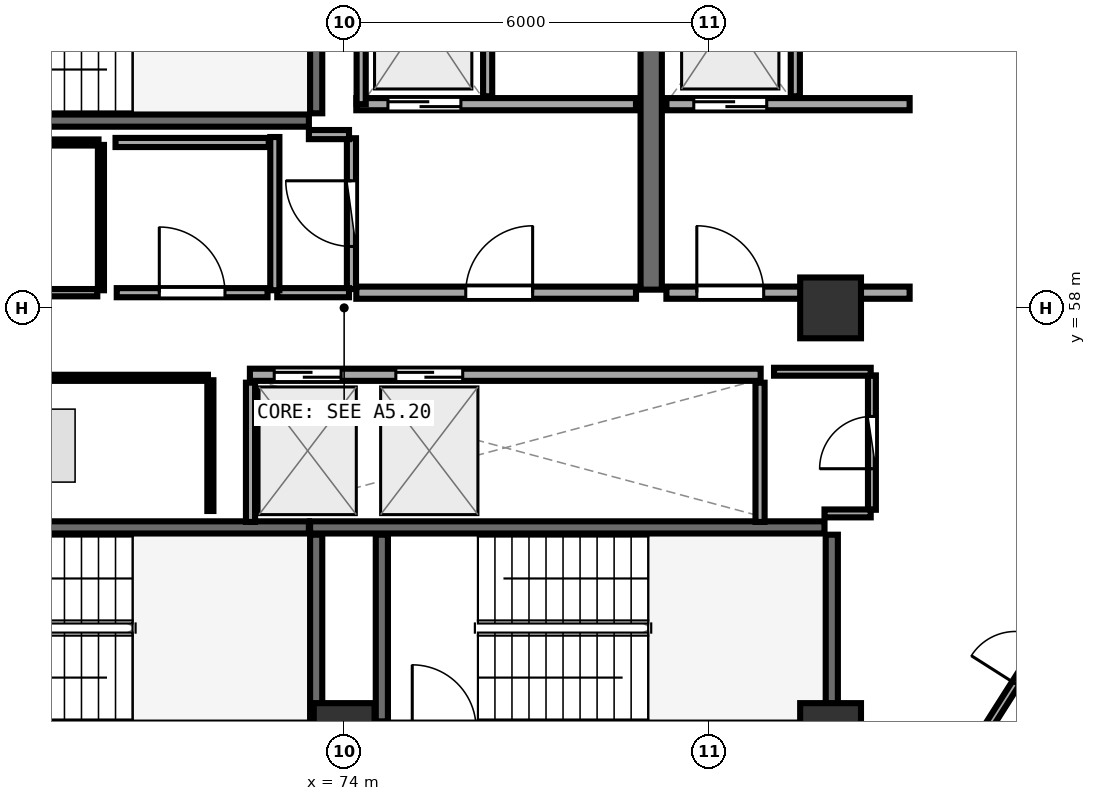
"""IFC4 building model, lengths in metres.
Left out: names, types, materials, properties, quantities, classifications, styles, units other than length and angle.
Written with IfcOpenShell. Run it as: python <this file> out.ifc"""

import sys

from ifc_helpers import new_model, si_unit, direction, frame, frame_2d, origin, origin_2d, place, context, subcontext, project, spatial, rectangle, extrude, element, fill, save


model = new_model("IFC4")
c1 = context("Model", 3, precision=1e-05, world=origin(), true_north=direction((0.0, 1.0)))
c2 = subcontext(c1, "Body", "Model", "MODEL_VIEW")
j1 = project(units=[si_unit("LENGTHUNIT", "METRE"), si_unit("PLANEANGLEUNIT", "RADIAN")], contexts=[c1])
p1 = place(None, origin())
s1 = spatial("IfcSite", under=j1, at=p1, CompositionType="ELEMENT")
p2 = place(p1, origin())
s2 = spatial("IfcBuilding", under=s1, at=p2, CompositionType="ELEMENT")
p3 = place(p2, frame((0.0, 0.0, 252.45)))
s3 = spatial("IfcBuildingStorey", under=s2, at=p3, CompositionType="ELEMENT", Elevation=252.45)
for number, where, z_axis, x_axis in (
    (1, (74.0, 51.0, 0.0), (0.0, 0.0, 1.0), (1.0, 0.0, 0.0)),
    (2, (82.0, 51.0, 0.0), (0.0, 0.0, 1.0), (1.0, 0.0, 0.0)),
    (3, (82.0, 58.0, 0.0), (0.0, 0.0, 1.0), (1.0, 0.0, 0.0)),
):
    element("IfcColumn", number, at=place(p3, frame(where, z_axis=z_axis, x_axis=x_axis)), inside=s3, PredefinedType="PILASTER", context=c2, shape_type="SweptSolid", body=[
        extrude(rectangle(XDim=1.0, YDim=1.0, at=origin_2d()), origin(), (0.0, 0.0, 1.0), 3.75),
    ])
p4 = place(p3, frame((66.26, 61.08, 0.0), z_axis=(0.0, 0.0, 1.0), x_axis=(1.0, 0.0, 0.0)))
e4 = element("IfcWall", 4, at=p4, inside=s3, PredefinedType="SHEAR", context=c2, shape_type="SweptSolid", body=[
    extrude(rectangle(XDim=7.16, YDim=0.2, at=frame_2d((3.58, 0.0))), origin(), (0.0, 0.0, 1.0), 3.49),
])
for number, where, z_axis, x_axis in (
    (5, (73.54, 61.2, 0.0), (0.0, 0.0, 1.0), (0.0, 1.0, 0.0)),
    (6, (82.02, 51.2, 0.0), (0.0, 0.0, 1.0), (0.0, 1.0, 0.0)),
):
    element("IfcWall", number, at=place(p3, frame(where, z_axis=z_axis, x_axis=x_axis)), inside=s3, PredefinedType="SHEAR", context=c2, shape_type="SweptSolid", body=[
        extrude(rectangle(XDim=3.07, YDim=0.2, at=frame_2d((1.535, 0.0))), origin(), (0.0, 0.0, 1.0), 3.49),
    ])
p5 = place(p3, frame((81.9, 54.39, 0.0), z_axis=(0.0, 0.0, 1.0), x_axis=(-1.0, 0.0, 0.0)))
e7 = element("IfcWall", 7, at=p5, inside=s3, PredefinedType="SHEAR", context=c2, shape_type="SweptSolid", body=[
    extrude(rectangle(XDim=8.46, YDim=0.2, at=frame_2d((4.23, 0.0))), origin(), (0.0, 0.0, 1.0), 3.49),
])
for number, where, z_axis, x_axis in (
    (8, (74.62, 54.27, 0.0), (0.0, 0.0, 1.0), (0.0, -1.0, 0.0)),
    (9, (73.54, 51.2, 0.0), (0.0, 0.0, 1.0), (0.0, 1.0, 0.0)),
):
    element("IfcWall", number, at=place(p3, frame(where, z_axis=z_axis, x_axis=x_axis)), inside=s3, PredefinedType="SHEAR", context=c2, shape_type="SweptSolid", body=[
        extrude(rectangle(XDim=3.07, YDim=0.2, at=frame_2d((1.535, 0.0))), origin(), (0.0, 0.0, 1.0), 3.49),
    ])
p6 = place(p3, frame((73.42, 54.39, 0.0), z_axis=(0.0, 0.0, 1.0), x_axis=(-1.0, 0.0, 0.0)))
e10 = element("IfcWall", 10, at=p6, inside=s3, PredefinedType="SHEAR", context=c2, shape_type="SweptSolid", body=[
    extrude(rectangle(XDim=7.16, YDim=0.2, at=frame_2d((3.58, 0.0))), origin(), (0.0, 0.0, 1.0), 3.49),
])
p7 = place(p3, frame((79.05, 58.3, 0.0), z_axis=(0.0, 0.0, 1.0), x_axis=(0.0, 1.0, 0.0)))
e11 = element("IfcWall", 11, at=p7, inside=s3, PredefinedType="SHEAR", context=c2, shape_type="SweptSolid", body=[
    extrude(rectangle(XDim=6.3, YDim=0.35, at=frame_2d((3.15, 0.0))), origin(), (0.0, 0.0, 1.0), 3.49),
])
p8 = place(p3, frame((74.2, 61.35, 0.0), z_axis=(0.0, 0.0, 1.0), x_axis=(1.0, 0.0, 0.0)))
e12 = element("IfcWall", 12, at=p8, inside=s3, PredefinedType="SOLIDWALL", context=c2, shape_type="SweptSolid", body=[
    extrude(rectangle(XDim=4.6, YDim=0.2, at=frame_2d((2.3, 0.0))), origin(), (0.0, 0.0, 1.0), 3.48),
])
p9 = place(p8, frame((0.52, 0.0, 0.0)))
e13 = element("IfcOpeningElement", 13, at=p9, cuts=e12, PredefinedType="OPENING", context=c2, shape_type="SweptSolid", body=[
    extrude(rectangle(XDim=1.2, YDim=2.15, at=frame_2d((0.6, 1.075))), frame((0.0, 0.11, 0.0), z_axis=(0.0, -1.0, 0.0), x_axis=(1.0, 0.0, 0.0)), (0.0, 0.0, 1.0), 0.22),
])
p10 = place(p3, frame((74.28, 61.35, 0.0), z_axis=(0.0, 0.0, 1.0), x_axis=(0.0, 1.0, 0.0)))
e14 = element("IfcWall", 14, at=p10, inside=s3, PredefinedType="PARTITIONING", context=c2, shape_type="SweptSolid", body=[
    extrude(rectangle(XDim=2.97, YDim=0.15, at=frame_2d((1.485, 0.0))), origin(), (0.0, 0.0, 1.0), 3.48),
])
p11 = place(p3, frame((76.36, 61.48, 0.0), z_axis=(0.0, 0.0, 1.0), x_axis=(0.0, 1.0, 0.0)))
e15 = element("IfcWall", 15, at=p11, inside=s3, PredefinedType="PARTITIONING", context=c2, shape_type="SweptSolid", body=[
    extrude(rectangle(XDim=2.84, YDim=0.15, at=frame_2d((1.42, 0.0))), origin(), (0.0, 0.0, 1.0), 3.48),
])
p12 = place(p3, frame((79.3, 61.35, 0.0), z_axis=(0.0, 0.0, 1.0), x_axis=(1.0, 0.0, 0.0)))
e16 = element("IfcWall", 16, at=p12, inside=s3, PredefinedType="SOLIDWALL", context=c2, shape_type="SweptSolid", body=[
    extrude(rectangle(XDim=4.0, YDim=0.2, at=frame_2d((2.0, 0.0))), origin(), (0.0, 0.0, 1.0), 2.775),
])
p13 = place(p12, frame((0.45, 0.0, 0.0)))
e17 = element("IfcOpeningElement", 17, at=p13, cuts=e16, PredefinedType="OPENING", context=c2, shape_type="SweptSolid", body=[
    extrude(rectangle(XDim=1.2, YDim=2.15, at=frame_2d((0.6, 1.075))), frame((0.0, 0.11, 0.0), z_axis=(0.0, -1.0, 0.0), x_axis=(1.0, 0.0, 0.0)), (0.0, 0.0, 1.0), 0.22),
])
p14 = place(p3, frame((81.42, 61.48, 0.0), z_axis=(0.0, 0.0, 1.0), x_axis=(0.0, 1.0, 0.0)))
e18 = element("IfcWall", 18, at=p14, inside=s3, PredefinedType="PARTITIONING", context=c2, shape_type="SweptSolid", body=[
    extrude(rectangle(XDim=2.84, YDim=0.15, at=frame_2d((1.42, 0.0))), origin(), (0.0, 0.0, 1.0), 3.48),
])
p15 = place(p3, frame((74.2, 58.25, 0.0), z_axis=(0.0, 0.0, 1.0), x_axis=(1.0, 0.0, 0.0)))
e19 = element("IfcWall", 19, at=p15, inside=s3, PredefinedType="SOLIDWALL", context=c2, shape_type="SweptSolid", body=[
    extrude(rectangle(XDim=4.6, YDim=0.2, at=frame_2d((2.3, 0.0))), origin(), (0.0, 0.0, 1.0), 3.48),
])
p16 = place(p15, frame((1.8, 0.0, 0.0)))
e20 = element("IfcOpeningElement", 20, at=p16, cuts=e19, PredefinedType="OPENING", context=c2, shape_type="SweptSolid", body=[
    extrude(rectangle(XDim=1.1, YDim=2.1, at=frame_2d((0.55, 1.05))), frame((0.0, 0.11, 0.0), z_axis=(0.0, -1.0, 0.0), x_axis=(1.0, 0.0, 0.0)), (0.0, 0.0, 1.0), 0.22),
])
p17 = place(p3, frame((79.3, 58.25, 0.0), z_axis=(0.0, 0.0, 1.0), x_axis=(1.0, 0.0, 0.0)))
e21 = element("IfcWall", 21, at=p17, inside=s3, PredefinedType="SOLIDWALL", context=c2, shape_type="SweptSolid", body=[
    extrude(rectangle(XDim=4.0, YDim=0.2, at=frame_2d((2.0, 0.0))), origin(), (0.0, 0.0, 1.0), 2.775),
])
p18 = place(p17, frame((0.5, 0.0, 0.0)))
e22 = element("IfcOpeningElement", 22, at=p18, cuts=e21, PredefinedType="OPENING", context=c2, shape_type="SweptSolid", body=[
    extrude(rectangle(XDim=1.1, YDim=2.1, at=frame_2d((0.55, 1.05))), frame((0.0, 0.11, 0.0), z_axis=(0.0, -1.0, 0.0), x_axis=(1.0, 0.0, 0.0)), (0.0, 0.0, 1.0), 0.22),
])
p19 = place(p3, frame((72.45, 56.9, 0.0), z_axis=(0.0, 0.0, 1.0), x_axis=(1.0, 0.0, 0.0)))
e23 = element("IfcWall", 23, at=p19, inside=s3, PredefinedType="SOLIDWALL", context=c2, shape_type="SweptSolid", body=[
    extrude(rectangle(XDim=8.4, YDim=0.2, at=frame_2d((4.2, 0.0))), origin(), (0.0, 0.0, 1.0), 3.48),
])
p20 = place(p19, frame((0.4, 0.0, 0.0)))
e24 = element("IfcOpeningElement", 24, at=p20, cuts=e23, PredefinedType="OPENING", context=c2, shape_type="SweptSolid", body=[
    extrude(rectangle(XDim=1.1, YDim=2.1, at=frame_2d((0.55, 1.05))), frame((0.0, 0.11, 0.0), z_axis=(0.0, -1.0, 0.0), x_axis=(1.0, 0.0, 0.0)), (0.0, 0.0, 1.0), 0.22),
])
p21 = place(p19, frame((2.4, 0.0, 0.0)))
e25 = element("IfcOpeningElement", 25, at=p21, cuts=e23, PredefinedType="OPENING", context=c2, shape_type="SweptSolid", body=[
    extrude(rectangle(XDim=1.1, YDim=2.1, at=frame_2d((0.55, 1.05))), frame((0.0, 0.11, 0.0), z_axis=(0.0, -1.0, 0.0), x_axis=(1.0, 0.0, 0.0)), (0.0, 0.0, 1.0), 0.22),
])
for number, where, z_axis, x_axis in (
    (26, (72.46, 54.48, 0.0), (0.0, 0.0, 1.0), (0.0, 1.0, 0.0)),
    (27, (80.84, 54.48, 0.0), (0.0, 0.0, 1.0), (0.0, 1.0, 0.0)),
):
    element("IfcWall", number, at=place(p3, frame(where, z_axis=z_axis, x_axis=x_axis)), inside=s3, PredefinedType="PARTITIONING", context=c2, shape_type="SweptSolid", body=[
        extrude(rectangle(XDim=2.29, YDim=0.15, at=frame_2d((1.145, 0.0))), origin(), (0.0, 0.0, 1.0), 3.48),
    ])
p22 = place(p3, frame((74.12, 58.31, 0.0), z_axis=(0.0, 0.0, 1.0), x_axis=(0.0, 1.0, 0.0)))
e28 = element("IfcWall", 28, at=p22, inside=s3, PredefinedType="PARTITIONING", context=c2, shape_type="SweptSolid", body=[
    extrude(rectangle(XDim=2.48, YDim=0.15, at=frame_2d((1.24, 0.0))), origin(), (0.0, 0.0, 1.0), 3.48),
])
p23 = place(p22, frame((0.7, 0.0, 0.0)))
e29 = element("IfcOpeningElement", 29, at=p23, cuts=e28, PredefinedType="OPENING", context=c2, shape_type="SweptSolid", body=[
    extrude(rectangle(XDim=1.08, YDim=2.1, at=frame_2d((0.54, 1.05))), frame((0.0, 0.085, 0.0), z_axis=(0.0, -1.0, 0.0), x_axis=(1.0, 0.0, 0.0)), (0.0, 0.0, 1.0), 0.17),
])
p24 = place(p3, frame((82.68, 54.68, 0.0), z_axis=(0.0, 0.0, 1.0), x_axis=(0.0, 1.0, 0.0)))
e30 = element("IfcWall", 30, at=p24, inside=s3, PredefinedType="PLUMBINGWALL", context=c2, shape_type="SweptSolid", body=[
    extrude(rectangle(XDim=2.21, YDim=0.13, at=frame_2d((1.105, 0.0))), origin(), (0.0, 0.0, 1.0), 3.48),
])
p25 = place(p24, frame((0.675, 0.0, 0.0)))
e31 = element("IfcOpeningElement", 31, at=p25, cuts=e30, PredefinedType="OPENING", context=c2, shape_type="SweptSolid", body=[
    extrude(rectangle(XDim=0.86, YDim=2.05, at=frame_2d((0.43, 1.025))), frame((0.0, 0.075, 0.0), z_axis=(0.0, -1.0, 0.0), x_axis=(1.0, 0.0, 0.0)), (0.0, 0.0, 1.0), 0.15),
])
p26 = place(p3, frame((66.61, 58.25, 0.0), z_axis=(0.0, 0.0, 1.0), x_axis=(1.0, 0.0, 0.0)))
e32 = element("IfcWall", 32, at=p26, inside=s3, PredefinedType="PARTITIONING", context=c2, shape_type="SweptSolid", body=[
    extrude(rectangle(XDim=3.33, YDim=0.12, at=frame_2d((1.665, 0.0))), origin(), (0.0, 0.0, 1.0), 3.48),
])
p27 = place(p26, frame((1.215, 0.0, 0.0)))
e33 = element("IfcOpeningElement", 33, at=p27, cuts=e32, PredefinedType="OPENING", context=c2, shape_type="SweptSolid", body=[
    extrude(rectangle(XDim=0.9, YDim=2.08, at=frame_2d((0.45, 1.04))), frame((0.0, 0.07, 0.0), z_axis=(0.0, -1.0, 0.0), x_axis=(1.0, 0.0, 0.0)), (0.0, 0.0, 1.0), 0.14),
])
p28 = place(p3, frame((70.26, 58.25, 0.0), z_axis=(0.0, 0.0, 1.0), x_axis=(1.0, 0.0, 0.0)))
e34 = element("IfcWall", 34, at=p28, inside=s3, PredefinedType="PARTITIONING", context=c2, shape_type="SweptSolid", body=[
    extrude(rectangle(XDim=2.48, YDim=0.15, at=frame_2d((1.24, 0.0))), origin(), (0.0, 0.0, 1.0), 3.48),
])
p29 = place(p28, frame((0.7, 0.0, 0.0)))
e35 = element("IfcOpeningElement", 35, at=p29, cuts=e34, PredefinedType="OPENING", context=c2, shape_type="SweptSolid", body=[
    extrude(rectangle(XDim=1.08, YDim=2.1, at=frame_2d((0.54, 1.05))), frame((0.0, 0.085, 0.0), z_axis=(0.0, -1.0, 0.0), x_axis=(1.0, 0.0, 0.0)), (0.0, 0.0, 1.0), 0.17),
])
p30 = place(p3, frame((86.456, 61.824, 0.0), z_axis=(0.0, 0.0, 1.0), x_axis=(-0.522665227064, 0.852538011128, 0.0)))
e36 = element("IfcWall", 36, at=p30, inside=s3, PredefinedType="PARTITIONING", context=c2, shape_type="SweptSolid", body=[
    extrude(rectangle(XDim=4.273, YDim=0.15, at=frame_2d((2.136, 0.0))), origin(), (0.0, 0.0, 1.0), 3.075),
])
p31 = place(p30, frame((1.661, 0.0, 0.0)))
e37 = element("IfcOpeningElement", 37, at=p31, cuts=e36, PredefinedType="OPENING", context=c2, shape_type="SweptSolid", body=[
    extrude(rectangle(XDim=0.95, YDim=2.08, at=frame_2d((0.475, 1.04))), frame((0.0, 0.085, 0.0), z_axis=(0.0, -1.0, 0.0), x_axis=(1.0, 0.0, 0.0)), (0.0, 0.0, 1.0), 0.17),
])
p32 = place(p3, frame((84.223, 50.533, 0.0), z_axis=(0.0, 0.0, 1.0), x_axis=(0.536434868975, 0.84394172272, 0.0)))
e38 = element("IfcWall", 38, at=p32, inside=s3, PredefinedType="PLUMBINGWALL", context=c2, shape_type="SweptSolid", body=[
    extrude(rectangle(XDim=3.908, YDim=0.13, at=frame_2d((1.954, 0.0))), origin(), (0.0, 0.0, 1.0), 3.075),
])
p33 = place(p32, frame((1.524, 0.0, 0.0)))
e39 = element("IfcOpeningElement", 39, at=p33, cuts=e38, PredefinedType="OPENING", context=c2, shape_type="SweptSolid", body=[
    extrude(rectangle(XDim=0.86, YDim=2.05, at=frame_2d((0.43, 1.025))), frame((0.0, 0.075, 0.0), z_axis=(0.0, -1.0, 0.0), x_axis=(1.0, 0.0, 0.0)), (0.0, 0.0, 1.0), 0.15),
])
p34 = place(p3, frame((72.9, 58.25, 0.0), z_axis=(0.0, 0.0, 1.0), x_axis=(1.0, 0.0, 0.0)))
e40 = element("IfcWall", 40, at=p34, inside=s3, PredefinedType="PARTITIONING", context=c2, shape_type="SweptSolid", body=[
    extrude(rectangle(XDim=1.18, YDim=0.15, at=frame_2d((0.59, 0.0))), origin(), (0.0, 0.0, 1.0), 3.48),
])
p35 = place(p3, frame((74.08, 60.85, 0.0), z_axis=(0.0, 0.0, 1.0), x_axis=(-1.0, 0.0, 0.0)))
e41 = element("IfcWall", 41, at=p35, inside=s3, PredefinedType="PARTITIONING", context=c2, shape_type="SweptSolid", body=[
    extrude(rectangle(XDim=0.66, YDim=0.15, at=frame_2d((0.33, 0.0))), origin(), (0.0, 0.0, 1.0), 3.48),
])
p36 = place(p3, frame((72.86, 60.81, 0.0), z_axis=(0.0, 0.0, 1.0), x_axis=(0.0, -1.0, 0.0)))
e42 = element("IfcWall", 42, at=p36, inside=s3, PredefinedType="PARTITIONING", context=c2, shape_type="SweptSolid", body=[
    extrude(rectangle(XDim=2.52, YDim=0.15, at=frame_2d((1.26, 0.0))), origin(), (0.0, 0.0, 1.0), 3.48),
])
p37 = place(p3, frame((81.9, 54.62, 0.0), z_axis=(0.0, 0.0, 1.0), x_axis=(1.0, 0.0, 0.0)))
e43 = element("IfcWall", 43, at=p37, inside=s3, PredefinedType="PLUMBINGWALL", context=c2, shape_type="SweptSolid", body=[
    extrude(rectangle(XDim=0.76, YDim=0.13, at=frame_2d((0.38, 0.0))), origin(), (0.0, 0.0, 1.0), 2.775),
])
p38 = place(p3, frame((82.66, 56.95, 0.0), z_axis=(0.0, 0.0, 1.0), x_axis=(-1.0, 0.0, 0.0)))
e44 = element("IfcWall", 44, at=p38, inside=s3, PredefinedType="PLUMBINGWALL", context=c2, shape_type="SweptSolid", body=[
    extrude(rectangle(XDim=1.59, YDim=0.13, at=frame_2d((0.795, 0.0))), origin(), (0.0, 0.0, 1.0), 2.775),
])
p39 = place(p3, frame((70.0, 58.29, 0.0), z_axis=(0.0, 0.0, 1.0), x_axis=(0.0, 1.0, 0.0)))
e45 = element("IfcWall", 45, at=p39, inside=s3, PredefinedType="PARTITIONING", context=c2, shape_type="SweptSolid", body=[
    extrude(rectangle(XDim=2.39, YDim=0.1, at=frame_2d((1.195, 0.0))), origin(), (0.0, 0.0, 1.0), 3.48),
])
p40 = place(p3, frame((69.96, 60.72, 0.0), z_axis=(0.0, 0.0, 1.0), x_axis=(-1.0, 0.0, 0.0)))
e46 = element("IfcWall", 46, at=p40, inside=s3, PredefinedType="PARTITIONING", context=c2, shape_type="SweptSolid", body=[
    extrude(rectangle(XDim=3.37, YDim=0.1, at=frame_2d((1.685, 0.0))), origin(), (0.0, 0.0, 1.0), 3.48),
])
p41 = place(p3, frame((72.76, 60.72, 0.0), z_axis=(0.0, 0.0, 1.0), x_axis=(-1.0, 0.0, 0.0)))
e47 = element("IfcWall", 47, at=p41, inside=s3, PredefinedType="PARTITIONING", context=c2, shape_type="SweptSolid", body=[
    extrude(rectangle(XDim=2.52, YDim=0.15, at=frame_2d((1.26, 0.0))), origin(), (0.0, 0.0, 1.0), 3.48),
])
p42 = place(p3, frame((71.8, 54.66, 0.0), z_axis=(0.0, 0.0, 1.0), x_axis=(0.0, 1.0, 0.0)))
e48 = element("IfcWall", 48, at=p42, inside=s3, PredefinedType="PARTITIONING", context=c2, shape_type="SweptSolid", body=[
    extrude(rectangle(XDim=2.15, YDim=0.1, at=frame_2d((1.075, 0.0))), origin(), (0.0, 0.0, 1.0), 3.48),
])
p43 = place(p3, frame((71.76, 56.85, 0.0), z_axis=(0.0, 0.0, 1.0), x_axis=(-1.0, 0.0, 0.0)))
e49 = element("IfcWall", 49, at=p43, inside=s3, PredefinedType="PARTITIONING", context=c2, shape_type="SweptSolid", body=[
    extrude(rectangle(XDim=5.57, YDim=0.1, at=frame_2d((2.785, 0.0))), origin(), (0.0, 0.0, 1.0), 2.775),
])
p44 = place(p9, origin())
e50 = element("IfcDoor", 50, at=p44, inside=s3, OperationType="DOUBLE_DOOR_SLIDING", PredefinedType="DOOR", context=c2, shape_type="SweptSolid", body=[
    extrude(rectangle(XDim=1.2, YDim=2.15, at=frame_2d((0.6, 1.075))), frame((0.0, 0.025, 0.0), z_axis=(0.0, -1.0, 0.0), x_axis=(1.0, 0.0, 0.0)), (0.0, 0.0, 1.0), 0.05),
])
fill(e13, e50)
p45 = place(p13, origin())
e51 = element("IfcDoor", 51, at=p45, inside=s3, OperationType="DOUBLE_DOOR_SLIDING", PredefinedType="DOOR", context=c2, shape_type="SweptSolid", body=[
    extrude(rectangle(XDim=1.2, YDim=2.15, at=frame_2d((0.6, 1.075))), frame((0.0, 0.025, 0.0), z_axis=(0.0, -1.0, 0.0), x_axis=(1.0, 0.0, 0.0)), (0.0, 0.0, 1.0), 0.05),
])
fill(e17, e51)
p46 = place(p16, frame((1.1, 0.0, 0.0), z_axis=(0.0, 0.0, 1.0), x_axis=(-1.0, 0.0, 0.0)))
e52 = element("IfcDoor", 52, at=p46, inside=s3, OperationType="SINGLE_SWING_LEFT", PredefinedType="DOOR", context=c2, shape_type="SweptSolid", body=[
    extrude(rectangle(XDim=1.1, YDim=2.1, at=frame_2d((0.55, 1.05))), frame((0.0, 0.025, 0.0), z_axis=(0.0, -1.0, 0.0), x_axis=(1.0, 0.0, 0.0)), (0.0, 0.0, 1.0), 0.05),
])
fill(e20, e52)
p47 = place(p18, frame((1.1, 0.0, 0.0), z_axis=(0.0, 0.0, 1.0), x_axis=(-1.0, 0.0, 0.0)))
e53 = element("IfcDoor", 53, at=p47, inside=s3, OperationType="SINGLE_SWING_RIGHT", PredefinedType="DOOR", context=c2, shape_type="SweptSolid", body=[
    extrude(rectangle(XDim=1.1, YDim=2.1, at=frame_2d((0.55, 1.05))), frame((0.0, 0.025, 0.0), z_axis=(0.0, -1.0, 0.0), x_axis=(1.0, 0.0, 0.0)), (0.0, 0.0, 1.0), 0.05),
])
fill(e22, e53)
p48 = place(p20, origin())
e54 = element("IfcDoor", 54, at=p48, inside=s3, OperationType="DOUBLE_DOOR_SLIDING", PredefinedType="DOOR", context=c2, shape_type="SweptSolid", body=[
    extrude(rectangle(XDim=1.1, YDim=2.1, at=frame_2d((0.55, 1.05))), frame((0.0, 0.025, 0.0), z_axis=(0.0, -1.0, 0.0), x_axis=(1.0, 0.0, 0.0)), (0.0, 0.0, 1.0), 0.05),
])
fill(e24, e54)
p49 = place(p21, origin())
e55 = element("IfcDoor", 55, at=p49, inside=s3, OperationType="DOUBLE_DOOR_SLIDING", PredefinedType="DOOR", context=c2, shape_type="SweptSolid", body=[
    extrude(rectangle(XDim=1.1, YDim=2.1, at=frame_2d((0.55, 1.05))), frame((0.0, 0.025, 0.0), z_axis=(0.0, -1.0, 0.0), x_axis=(1.0, 0.0, 0.0)), (0.0, 0.0, 1.0), 0.05),
])
fill(e25, e55)
p50 = place(p23, origin())
e56 = element("IfcDoor", 56, at=p50, inside=s3, OperationType="SINGLE_SWING_RIGHT", PredefinedType="DOOR", context=c2, shape_type="SweptSolid", body=[
    extrude(rectangle(XDim=1.08, YDim=2.1, at=frame_2d((0.54, 1.05))), frame((0.0, 0.025, 0.0), z_axis=(0.0, -1.0, 0.0), x_axis=(1.0, 0.0, 0.0)), (0.0, 0.0, 1.0), 0.05),
])
fill(e29, e56)
p51 = place(p25, origin())
e57 = element("IfcDoor", 57, at=p51, inside=s3, OperationType="SINGLE_SWING_LEFT", PredefinedType="DOOR", context=c2, shape_type="SweptSolid", body=[
    extrude(rectangle(XDim=0.86, YDim=2.05, at=frame_2d((0.43, 1.025))), frame((0.0, 0.025, 0.0), z_axis=(0.0, -1.0, 0.0), x_axis=(1.0, 0.0, 0.0)), (0.0, 0.0, 1.0), 0.05),
])
fill(e31, e57)
p52 = place(p29, origin())
e58 = element("IfcDoor", 58, at=p52, inside=s3, OperationType="SINGLE_SWING_LEFT", PredefinedType="DOOR", context=c2, shape_type="SweptSolid", body=[
    extrude(rectangle(XDim=1.08, YDim=2.1, at=frame_2d((0.54, 1.05))), frame((0.0, 0.025, 0.0), z_axis=(0.0, -1.0, 0.0), x_axis=(1.0, 0.0, 0.0)), (0.0, 0.0, 1.0), 0.05),
])
fill(e35, e58)
p53 = place(p33, origin())
e59 = element("IfcDoor", 59, at=p53, inside=s3, OperationType="SINGLE_SWING_LEFT", PredefinedType="DOOR", context=c2, shape_type="SweptSolid", body=[
    extrude(rectangle(XDim=0.86, YDim=2.05, at=frame_2d((0.43, 1.025))), frame((0.0, 0.025, 0.0), z_axis=(0.0, -1.0, 0.0), x_axis=(1.0, 0.0, 0.0)), (0.0, 0.0, 1.0), 0.05),
])
fill(e39, e59)
save(model, sys.argv[1])
